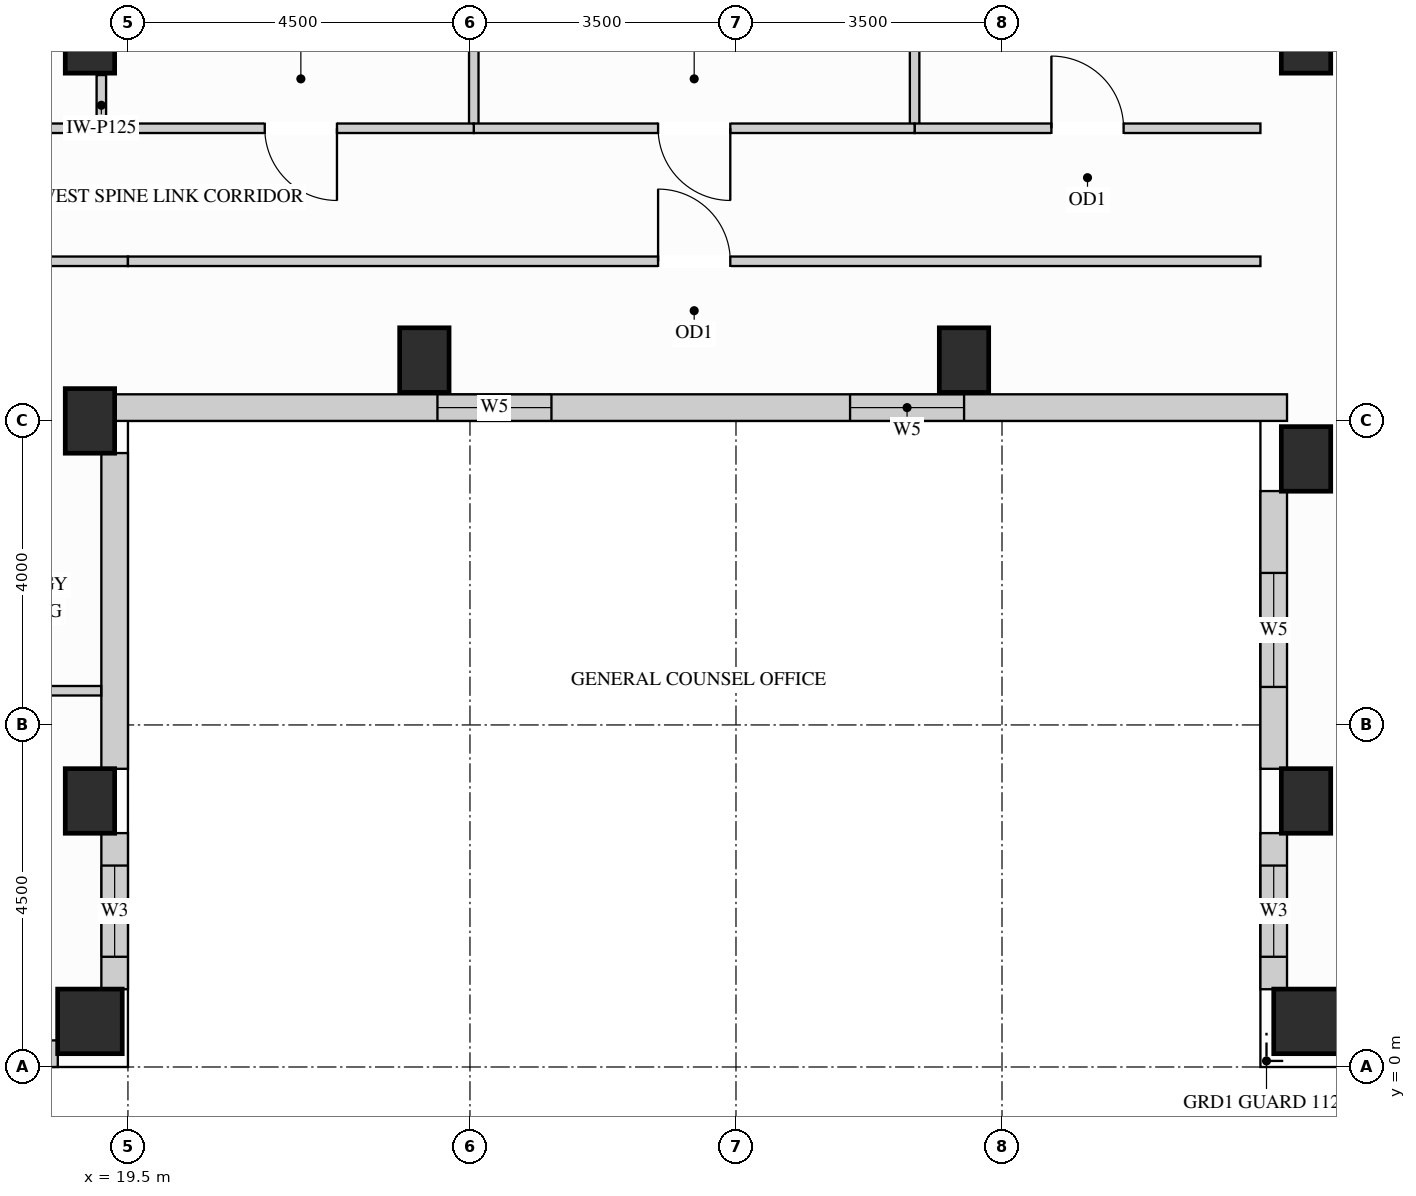
"""IFC4 building model, lengths in metres.
Left out: names, types, materials, properties, quantities, classifications, styles, units other than length and angle.
Written with IfcOpenShell. Run it as: python <this file> out.ifc"""

import sys

from ifc_helpers import new_model, si_unit, direction, frame, frame_2d, origin, origin_2d, place, context, subcontext, project, spatial, rectangle, extrude, source, transform, mapped, element, fill, save


model = new_model("IFC4")
c1 = context("Model", 3, precision=1e-05, world=origin(), true_north=direction((0.0, 1.0)))
c2 = subcontext(c1, "Body", "Model", "MODEL_VIEW")
j1 = project(units=[si_unit("LENGTHUNIT", "METRE"), si_unit("PLANEANGLEUNIT", "RADIAN")], contexts=[c1])
p1 = place(None, origin())
s1 = spatial("IfcSite", under=j1, at=p1, CompositionType="ELEMENT")
p2 = place(p1, origin())
s2 = spatial("IfcBuilding", under=s1, at=p2, CompositionType="ELEMENT")
p3 = place(p2, frame((0.0, 0.0, 223.2)))
s3 = spatial("IfcBuildingStorey", under=s2, at=p3, CompositionType="ELEMENT", Elevation=223.2)
m1 = source(origin(), c2, "Body", "SweptSolid", [
    extrude(rectangle(XDim=0.65, YDim=0.85, at=origin_2d()), origin(), (0.0, 0.0, 1.0), 3.4),
])
for number, where, z_axis, x_axis in (
    (1, (19.0, 13.5, 0.0), (0.0, 0.0, 1.0), (1.0, 0.0, 0.0)),
    (2, (19.0, 3.5, 0.0), (0.0, 0.0, 1.0), (1.0, 0.0, 0.0)),
    (3, (19.0, 8.5, 0.0), (0.0, 0.0, 1.0), (1.0, 0.0, 0.0)),
    (4, (35.0, 13.5, 0.0), (0.0, 0.0, 1.0), (1.0, 0.0, 0.0)),
    (5, (35.0, 3.5, 0.0), (0.0, 0.0, 1.0), (1.0, 0.0, 0.0)),
    (6, (35.0, 8.0, 0.0), (0.0, 0.0, 1.0), (1.0, 0.0, 0.0)),
    (7, (23.4, 9.3, 0.0), (0.0, 0.0, 1.0), (1.0, 0.0, 0.0)),
    (8, (30.5, 9.3, 0.0), (0.0, 0.0, 1.0), (1.0, 0.0, 0.0)),
):
    element("IfcColumn", number, at=place(p3, frame(where, z_axis=z_axis, x_axis=x_axis)), inside=s3, PredefinedType="COLUMN", context=c2, shape_type="MappedRepresentation", body=[
        mapped(m1, transform((0.0, 0.0, 0.0), x_axis=(1.0, 0.0, 0.0), y_axis=(0.0, 1.0, 0.0), z_axis=(0.0, 0.0, 1.0))),
    ])
m2 = source(origin(), c2, "Body", "SweptSolid", [
    extrude(rectangle(XDim=0.85, YDim=0.85, at=origin_2d()), origin(), (0.0, 0.0, 1.0), 3.4),
])
for number, where, z_axis, x_axis in (
    (9, (19.0, 0.6, 0.0), (0.0, 0.0, 1.0), (1.0, 0.0, 0.0)),
    (10, (35.0, 0.6, 0.0), (0.0, 0.0, 1.0), (1.0, 0.0, 0.0)),
):
    element("IfcColumn", number, at=place(p3, frame(where, z_axis=z_axis, x_axis=x_axis)), inside=s3, PredefinedType="COLUMN", context=c2, shape_type="MappedRepresentation", body=[
        mapped(m2, transform((0.0, 0.0, 0.0), x_axis=(1.0, 0.0, 0.0), y_axis=(0.0, 1.0, 0.0), z_axis=(0.0, 0.0, 1.0))),
    ])
p4 = place(p3, frame((14.923, 0.175, 0.0), z_axis=(0.0, 0.0, 1.0), x_axis=(1.0, 0.0, 0.0)))
e11 = element("IfcWall", 11, at=p4, inside=s3, PredefinedType="SOLIDWALL", context=c2, shape_type="SweptSolid", body=[
    extrude(rectangle(XDim=3.654, YDim=0.35, at=frame_2d((1.827, 0.0))), origin(), (0.0, 0.0, 1.0), 3.385),
])
p5 = place(p4, frame((0.627, 0.0, 0.78)))
e12 = element("IfcOpeningElement", 12, at=p5, cuts=e11, PredefinedType="OPENING", context=c2, shape_type="SweptSolid", body=[
    extrude(rectangle(XDim=2.4, YDim=2.1, at=frame_2d((1.2, 1.05))), frame((0.0, 0.185, 0.0), z_axis=(0.0, -1.0, 0.0), x_axis=(1.0, 0.0, 0.0)), (0.0, 0.0, 1.0), 0.37),
])
p6 = place(p3, frame((19.325, 1.023, 0.0), z_axis=(0.0, 0.0, 1.0), x_axis=(0.0, 1.0, 0.0)))
e13 = element("IfcWall", 13, at=p6, inside=s3, PredefinedType="SOLIDWALL", context=c2, shape_type="SweptSolid", body=[
    extrude(rectangle(XDim=2.054, YDim=0.35, at=frame_2d((1.027, 0.0))), origin(), (0.0, 0.0, 1.0), 2.619),
])
p7 = place(p6, frame((0.427, 0.0, 0.78)))
e14 = element("IfcOpeningElement", 14, at=p7, cuts=e13, PredefinedType="OPENING", context=c2, shape_type="SweptSolid", body=[
    extrude(rectangle(XDim=1.2, YDim=1.659, at=frame_2d((0.6, 0.83))), frame((0.0, 0.185, 0.0), z_axis=(0.0, -1.0, 0.0), x_axis=(1.0, 0.0, 0.0)), (0.0, 0.0, 1.0), 0.37),
])
m3 = source(origin(), c2, "Body", "SweptSolid", [
    extrude(rectangle(XDim=4.154, YDim=0.35, at=frame_2d((2.077, 0.0))), origin(), (0.0, 0.0, 1.0), 2.619),
])
p8 = place(p3, frame((19.325, 3.923, 0.0), z_axis=(0.0, 0.0, 1.0), x_axis=(0.0, 1.0, 0.0)))
e15 = element("IfcWall", 15, at=p8, inside=s3, PredefinedType="SOLIDWALL", context=c2, shape_type="MappedRepresentation", body=[
    mapped(m3, transform((0.0, 0.0, 0.0), x_axis=(1.0, 0.0, 0.0), y_axis=(0.0, 1.0, 0.0), z_axis=(0.0, 0.0, 1.0))),
])
p9 = place(p3, frame((19.323, 8.675, 0.0), z_axis=(0.0, 0.0, 1.0), x_axis=(1.0, 0.0, 0.0)))
e16 = element("IfcWall", 16, at=p9, inside=s3, PredefinedType="SOLIDWALL", context=c2, shape_type="SweptSolid", body=[
    extrude(rectangle(XDim=15.427, YDim=0.35, at=frame_2d((7.713, 0.0))), origin(), (0.0, 0.0, 1.0), 3.385),
])
p10 = place(p9, frame((4.249, 0.0, 0.78)))
e17 = element("IfcOpeningElement", 17, at=p10, cuts=e16, PredefinedType="OPENING", context=c2, shape_type="SweptSolid", body=[
    extrude(rectangle(XDim=1.5, YDim=2.0, at=frame_2d((0.75, 1.0))), frame((0.0, 0.185, 0.0), z_axis=(0.0, -1.0, 0.0), x_axis=(1.0, 0.0, 0.0)), (0.0, 0.0, 1.0), 0.37),
])
p11 = place(p9, frame((9.678, 0.0, 0.78)))
e18 = element("IfcOpeningElement", 18, at=p11, cuts=e16, PredefinedType="OPENING", context=c2, shape_type="SweptSolid", body=[
    extrude(rectangle(XDim=1.5, YDim=2.0, at=frame_2d((0.75, 1.0))), frame((0.0, 0.185, 0.0), z_axis=(0.0, -1.0, 0.0), x_axis=(1.0, 0.0, 0.0)), (0.0, 0.0, 1.0), 0.37),
])
p12 = place(p3, frame((34.575, 7.577, 0.0), z_axis=(0.0, 0.0, 1.0), x_axis=(0.0, -1.0, 0.0)))
e19 = element("IfcWall", 19, at=p12, inside=s3, PredefinedType="SOLIDWALL", context=c2, shape_type="SweptSolid", body=[
    extrude(rectangle(XDim=3.654, YDim=0.35, at=frame_2d((1.827, 0.0))), origin(), (0.0, 0.0, 1.0), 3.385),
])
p13 = place(p12, frame((1.077, 0.0, 0.78)))
e20 = element("IfcOpeningElement", 20, at=p13, cuts=e19, PredefinedType="OPENING", context=c2, shape_type="SweptSolid", body=[
    extrude(rectangle(XDim=1.5, YDim=2.0, at=frame_2d((0.75, 1.0))), frame((0.0, 0.185, 0.0), z_axis=(0.0, -1.0, 0.0), x_axis=(1.0, 0.0, 0.0)), (0.0, 0.0, 1.0), 0.37),
])
p14 = place(p3, frame((34.575, 3.077, 0.0), z_axis=(0.0, 0.0, 1.0), x_axis=(0.0, -1.0, 0.0)))
e21 = element("IfcWall", 21, at=p14, inside=s3, PredefinedType="SOLIDWALL", context=c2, shape_type="SweptSolid", body=[
    extrude(rectangle(XDim=2.054, YDim=0.35, at=frame_2d((1.027, 0.0))), origin(), (0.0, 0.0, 1.0), 3.385),
])
p15 = place(p14, frame((0.427, 0.0, 0.78)))
e22 = element("IfcOpeningElement", 22, at=p15, cuts=e21, PredefinedType="OPENING", context=c2, shape_type="SweptSolid", body=[
    extrude(rectangle(XDim=1.2, YDim=2.0, at=frame_2d((0.6, 1.0))), frame((0.0, 0.185, 0.0), z_axis=(0.0, -1.0, 0.0), x_axis=(1.0, 0.0, 0.0)), (0.0, 0.0, 1.0), 0.37),
])
m4 = source(origin(), c2, "Body", "SweptSolid", [
    extrude(rectangle(XDim=0.7, YDim=0.125, at=frame_2d((0.35, 0.0))), origin(), (0.0, 0.0, 1.0), 2.773),
])
p16 = place(p3, frame((19.15, 12.35, 0.0), z_axis=(0.0, 0.0, 1.0), x_axis=(0.0, 1.0, 0.0)))
e23 = element("IfcWall", 23, at=p16, inside=s3, PredefinedType="PARTITIONING", context=c2, shape_type="MappedRepresentation", body=[
    mapped(m4, transform((0.0, 0.0, 0.0), x_axis=(1.0, 0.0, 0.0), y_axis=(0.0, 1.0, 0.0), z_axis=(0.0, 0.0, 1.0))),
])
m5 = source(origin(), c2, "Body", "SweptSolid", [
    extrude(rectangle(XDim=3.798, YDim=0.125, at=frame_2d((1.899, 0.0))), origin(), (0.0, 0.0, 1.0), 3.385),
])
for number, where, z_axis, x_axis in (
    (24, (24.05, 12.35, 0.0), (0.0, 0.0, 1.0), (0.0, 1.0, 0.0)),
    (25, (29.85, 12.35, 0.0), (0.0, 0.0, 1.0), (0.0, 1.0, 0.0)),
):
    element("IfcWall", number, at=place(p3, frame(where, z_axis=z_axis, x_axis=x_axis)), inside=s3, PredefinedType="PARTITIONING", context=c2, shape_type="MappedRepresentation", body=[
        mapped(m5, transform((0.0, 0.0, 0.0), x_axis=(1.0, 0.0, 0.0), y_axis=(0.0, 1.0, 0.0), z_axis=(0.0, 0.0, 1.0))),
    ])
p17 = place(p3, frame((29.85, 12.35, 0.0), z_axis=(0.0, 0.0, 1.0), x_axis=(1.0, 0.0, 0.0)))
e26 = element("IfcWall", 26, at=p17, inside=s3, PredefinedType="PARTITIONING", context=c2, shape_type="SweptSolid", body=[
    extrude(rectangle(XDim=4.55, YDim=0.125, at=frame_2d((2.275, 0.0))), origin(), (0.0, 0.0, 1.0), 3.385),
])
p18 = place(p17, frame((1.8, 0.0, 0.0)))
e27 = element("IfcOpeningElement", 27, at=p18, cuts=e26, PredefinedType="OPENING", context=c2, shape_type="SweptSolid", body=[
    extrude(rectangle(XDim=0.95, YDim=2.15, at=frame_2d((0.475, 1.075))), frame((0.0, 0.073, 0.0), z_axis=(0.0, -1.0, 0.0), x_axis=(1.0, 0.0, 0.0)), (0.0, 0.0, 1.0), 0.145),
])
p19 = place(p3, frame((24.05, 12.35, 0.0), z_axis=(0.0, 0.0, 1.0), x_axis=(1.0, 0.0, 0.0)))
e28 = element("IfcWall", 28, at=p19, inside=s3, PredefinedType="PARTITIONING", context=c2, shape_type="SweptSolid", body=[
    extrude(rectangle(XDim=5.8, YDim=0.125, at=frame_2d((2.9, 0.0))), origin(), (0.0, 0.0, 1.0), 3.385),
])
p20 = place(p19, frame((2.425, 0.0, 0.0)))
e29 = element("IfcOpeningElement", 29, at=p20, cuts=e28, PredefinedType="OPENING", context=c2, shape_type="SweptSolid", body=[
    extrude(rectangle(XDim=0.95, YDim=2.15, at=frame_2d((0.475, 1.075))), frame((0.0, 0.073, 0.0), z_axis=(0.0, -1.0, 0.0), x_axis=(1.0, 0.0, 0.0)), (0.0, 0.0, 1.0), 0.145),
])
m6 = source(origin(), c2, "Body", "SweptSolid", [
    extrude(rectangle(XDim=2.45, YDim=0.125, at=frame_2d((1.225, 0.0))), origin(), (0.0, 0.0, 1.0), 3.385),
])
p21 = place(p3, frame((17.05, 12.35, 0.0), z_axis=(0.0, 0.0, 1.0), x_axis=(1.0, 0.0, 0.0)))
e30 = element("IfcWall", 30, at=p21, inside=s3, PredefinedType="PARTITIONING", context=c2, shape_type="MappedRepresentation", body=[
    mapped(m6, transform((0.0, 0.0, 0.0), x_axis=(1.0, 0.0, 0.0), y_axis=(0.0, 1.0, 0.0), z_axis=(0.0, 0.0, 1.0))),
])
p22 = place(p3, frame((19.5, 12.35, 0.0), z_axis=(0.0, 0.0, 1.0), x_axis=(1.0, 0.0, 0.0)))
e31 = element("IfcWall", 31, at=p22, inside=s3, PredefinedType="PARTITIONING", context=c2, shape_type="SweptSolid", body=[
    extrude(rectangle(XDim=4.55, YDim=0.125, at=frame_2d((2.275, 0.0))), origin(), (0.0, 0.0, 1.0), 3.385),
])
p23 = place(p22, frame((1.8, 0.0, 0.0)))
e32 = element("IfcOpeningElement", 32, at=p23, cuts=e31, PredefinedType="OPENING", context=c2, shape_type="SweptSolid", body=[
    extrude(rectangle(XDim=0.95, YDim=2.15, at=frame_2d((0.475, 1.075))), frame((0.0, 0.073, 0.0), z_axis=(0.0, -1.0, 0.0), x_axis=(1.0, 0.0, 0.0)), (0.0, 0.0, 1.0), 0.145),
])
p24 = place(p3, frame((17.05, 10.6, 0.0), z_axis=(0.0, 0.0, 1.0), x_axis=(1.0, 0.0, 0.0)))
e33 = element("IfcWall", 33, at=p24, inside=s3, PredefinedType="PARTITIONING", context=c2, shape_type="MappedRepresentation", body=[
    mapped(m6, transform((0.0, 0.0, 0.0), x_axis=(1.0, 0.0, 0.0), y_axis=(0.0, 1.0, 0.0), z_axis=(0.0, 0.0, 1.0))),
])
p25 = place(p3, frame((19.5, 10.6, 0.0), z_axis=(0.0, 0.0, 1.0), x_axis=(1.0, 0.0, 0.0)))
e34 = element("IfcWall", 34, at=p25, inside=s3, PredefinedType="PARTITIONING", context=c2, shape_type="SweptSolid", body=[
    extrude(rectangle(XDim=14.9, YDim=0.125, at=frame_2d((7.45, 0.0))), origin(), (0.0, 0.0, 1.0), 3.385),
])
p26 = place(p25, frame((6.975, 0.0, 0.0)))
e35 = element("IfcOpeningElement", 35, at=p26, cuts=e34, PredefinedType="OPENING", context=c2, shape_type="SweptSolid", body=[
    extrude(rectangle(XDim=0.95, YDim=2.15, at=frame_2d((0.475, 1.075))), frame((0.0, 0.073, 0.0), z_axis=(0.0, -1.0, 0.0), x_axis=(1.0, 0.0, 0.0)), (0.0, 0.0, 1.0), 0.145),
])
m7 = source(origin(), c2, "Body", "SweptSolid", [
    extrude(rectangle(XDim=2.098, YDim=0.125, at=frame_2d((1.049, 0.0))), origin(), (0.0, 0.0, 1.0), 2.848),
])
p27 = place(p3, frame((17.05, 4.95, 0.0), z_axis=(0.0, 0.0, 1.0), x_axis=(1.0, 0.0, 0.0)))
e36 = element("IfcWall", 36, at=p27, inside=s3, PredefinedType="PARTITIONING", context=c2, shape_type="MappedRepresentation", body=[
    mapped(m7, transform((0.0, 0.0, 0.0), x_axis=(1.0, 0.0, 0.0), y_axis=(0.0, 1.0, 0.0), z_axis=(0.0, 0.0, 1.0))),
])
m8 = source(origin(), c2, "Body", "SweptSolid", [
    extrude(rectangle(XDim=0.95, YDim=2.15, at=frame_2d((0.475, 1.075))), frame((0.0, 0.025, 0.0), z_axis=(0.0, -1.0, 0.0), x_axis=(1.0, 0.0, 0.0)), (0.0, 0.0, 1.0), 0.05),
])
p28 = place(p20, origin())
e37 = element("IfcDoor", 37, at=p28, inside=s3, OperationType="SINGLE_SWING_RIGHT", PredefinedType="DOOR", context=c2, shape_type="MappedRepresentation", body=[
    mapped(m8, transform((0.0, 0.0, 0.0), x_axis=(1.0, 0.0, 0.0), y_axis=(0.0, 1.0, 0.0), z_axis=(0.0, 0.0, 1.0))),
])
fill(e29, e37)
p29 = place(p23, origin())
e38 = element("IfcDoor", 38, at=p29, inside=s3, OperationType="SINGLE_SWING_RIGHT", PredefinedType="DOOR", context=c2, shape_type="MappedRepresentation", body=[
    mapped(m8, transform((0.0, 0.0, 0.0), x_axis=(1.0, 0.0, 0.0), y_axis=(0.0, 1.0, 0.0), z_axis=(0.0, 0.0, 1.0))),
])
fill(e32, e38)
p30 = place(p18, origin())
e39 = element("IfcDoor", 39, at=p30, inside=s3, OperationType="SINGLE_SWING_LEFT", PredefinedType="DOOR", context=c2, shape_type="MappedRepresentation", body=[
    mapped(m8, transform((0.0, 0.0, 0.0), x_axis=(1.0, 0.0, 0.0), y_axis=(0.0, 1.0, 0.0), z_axis=(0.0, 0.0, 1.0))),
])
fill(e27, e39)
p31 = place(p26, origin())
e40 = element("IfcDoor", 40, at=p31, inside=s3, OperationType="SINGLE_SWING_LEFT", PredefinedType="DOOR", context=c2, shape_type="MappedRepresentation", body=[
    mapped(m8, transform((0.0, 0.0, 0.0), x_axis=(1.0, 0.0, 0.0), y_axis=(0.0, 1.0, 0.0), z_axis=(0.0, 0.0, 1.0))),
])
fill(e35, e40)
m9 = source(origin(), c2, "Body", "SweptSolid", [
    extrude(rectangle(XDim=1.2, YDim=1.659, at=frame_2d((0.6, 0.83))), frame((0.0, 0.03, 0.0), z_axis=(0.0, -1.0, 0.0), x_axis=(1.0, 0.0, 0.0)), (0.0, 0.0, 1.0), 0.06),
])
p32 = place(p7, origin())
e41 = element("IfcWindow", 41, at=p32, inside=s3, PartitioningType="SINGLE_PANEL", PredefinedType="WINDOW", context=c2, shape_type="MappedRepresentation", body=[
    mapped(m9, transform((0.0, 0.0, 0.0), x_axis=(1.0, 0.0, 0.0), y_axis=(0.0, 1.0, 0.0), z_axis=(0.0, 0.0, 1.0))),
])
fill(e14, e41)
m10 = source(origin(), c2, "Body", "SweptSolid", [
    extrude(rectangle(XDim=1.2, YDim=2.0, at=frame_2d((0.6, 1.0))), frame((0.0, 0.03, 0.0), z_axis=(0.0, -1.0, 0.0), x_axis=(1.0, 0.0, 0.0)), (0.0, 0.0, 1.0), 0.06),
])
p33 = place(p15, origin())
e42 = element("IfcWindow", 42, at=p33, inside=s3, PartitioningType="SINGLE_PANEL", PredefinedType="WINDOW", context=c2, shape_type="MappedRepresentation", body=[
    mapped(m10, transform((0.0, 0.0, 0.0), x_axis=(1.0, 0.0, 0.0), y_axis=(0.0, 1.0, 0.0), z_axis=(0.0, 0.0, 1.0))),
])
fill(e22, e42)
m11 = source(origin(), c2, "Body", "SweptSolid", [
    extrude(rectangle(XDim=1.5, YDim=2.0, at=frame_2d((0.75, 1.0))), frame((0.0, 0.03, 0.0), z_axis=(0.0, -1.0, 0.0), x_axis=(1.0, 0.0, 0.0)), (0.0, 0.0, 1.0), 0.06),
])
p34 = place(p10, origin())
e43 = element("IfcWindow", 43, at=p34, inside=s3, PartitioningType="SINGLE_PANEL", PredefinedType="WINDOW", context=c2, shape_type="MappedRepresentation", body=[
    mapped(m11, transform((0.0, 0.0, 0.0), x_axis=(1.0, 0.0, 0.0), y_axis=(0.0, 1.0, 0.0), z_axis=(0.0, 0.0, 1.0))),
])
fill(e17, e43)
p35 = place(p11, origin())
e44 = element("IfcWindow", 44, at=p35, inside=s3, PartitioningType="SINGLE_PANEL", PredefinedType="WINDOW", context=c2, shape_type="MappedRepresentation", body=[
    mapped(m11, transform((0.0, 0.0, 0.0), x_axis=(1.0, 0.0, 0.0), y_axis=(0.0, 1.0, 0.0), z_axis=(0.0, 0.0, 1.0))),
])
fill(e18, e44)
p36 = place(p13, origin())
e45 = element("IfcWindow", 45, at=p36, inside=s3, PartitioningType="SINGLE_PANEL", PredefinedType="WINDOW", context=c2, shape_type="MappedRepresentation", body=[
    mapped(m11, transform((0.0, 0.0, 0.0), x_axis=(1.0, 0.0, 0.0), y_axis=(0.0, 1.0, 0.0), z_axis=(0.0, 0.0, 1.0))),
])
fill(e20, e45)
save(model, sys.argv[1])
